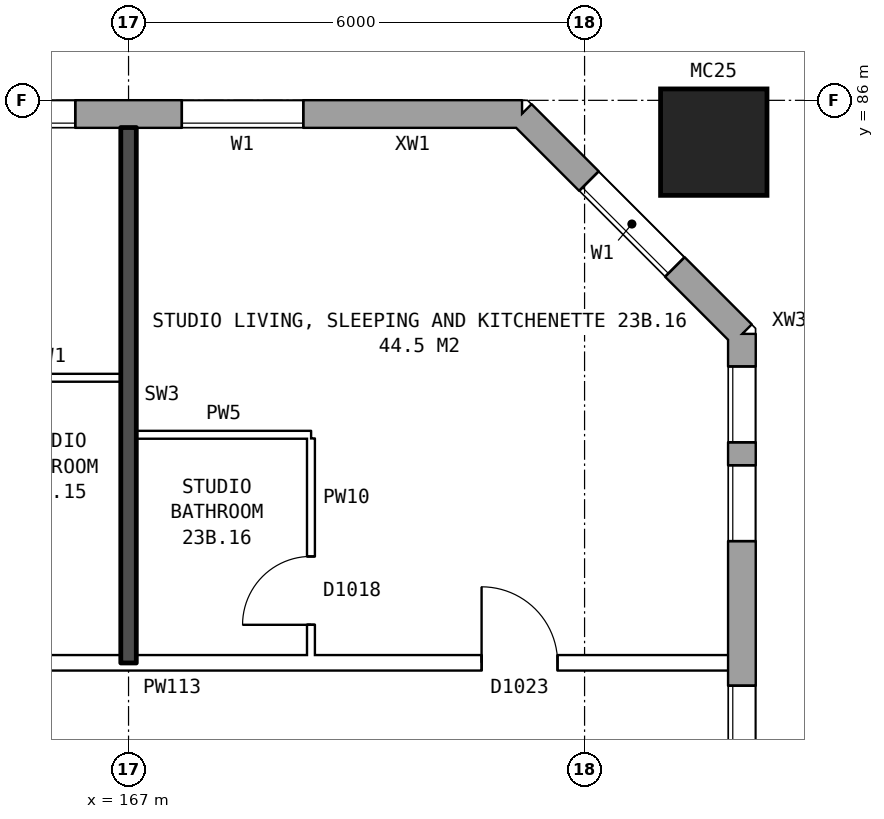
"""IFC4 building model, lengths in metres.
Left out: names, types, materials, properties, quantities, classifications, styles, units other than length and angle.
Written with IfcOpenShell. Run it as: python <this file> out.ifc"""

import sys

from ifc_helpers import new_model, si_unit, direction, frame, frame_2d, origin, origin_2d, place, context, subcontext, project, spatial, rectangle, hollow_rectangle, extrude, element, fill, save


model = new_model("IFC4")
c1 = context("Model", 3, precision=1e-05, world=origin(), true_north=direction((0.0, 1.0)))
c2 = subcontext(c1, "Body", "Model", "MODEL_VIEW")
j1 = project(units=[si_unit("LENGTHUNIT", "METRE"), si_unit("PLANEANGLEUNIT", "RADIAN")], contexts=[c1])
p1 = place(None, origin())
s1 = spatial("IfcSite", under=j1, at=p1, CompositionType="ELEMENT")
p2 = place(p1, origin())
s2 = spatial("IfcBuilding", under=s1, at=p2, CompositionType="ELEMENT")
p3 = place(p2, frame((0.0, 0.0, 84.0)))
s3 = spatial("IfcBuildingStorey", under=s2, at=p3, CompositionType="ELEMENT", Elevation=84.0)
p4 = place(p3, frame((174.7, 85.45, 0.0), z_axis=(0.0, 0.0, 1.0), x_axis=(1.0, 0.0, 0.0)))
e1 = element("IfcColumn", 1, at=p4, inside=s3, PredefinedType="COLUMN", context=c2, shape_type="SweptSolid", body=[
    extrude(hollow_rectangle(XDim=1.4, YDim=1.4, WallThickness=0.075, at=origin_2d()), origin(), (0.0, 0.0, 1.0), 3.1),
])
p5 = place(p3, frame((175.07, 57.075, 0.0), z_axis=(0.0, 0.0, 1.0), x_axis=(0.0, 1.0, 0.0)))
e2 = element("IfcWall", 2, at=p5, inside=s3, PredefinedType="STANDARD", context=c2, shape_type="SweptSolid", body=[
    extrude(rectangle(XDim=25.851, YDim=0.36, at=frame_2d((12.925, 0.0))), origin(), (0.0, 0.0, 1.0), 2.85),
])
p6 = place(p5, frame((0.3, 0.0, 0.8)))
e3 = element("IfcOpeningElement", 3, at=p6, cuts=e2, PredefinedType="OPENING", context=c2, shape_type="SweptSolid", body=[
    extrude(rectangle(XDim=1.0, YDim=1.8, at=frame_2d((0.5, 0.9))), frame((0.0, 0.19, 0.0), z_axis=(0.0, -1.0, 0.0), x_axis=(1.0, 0.0, 0.0)), (0.0, 0.0, 1.0), 0.38),
])
p7 = place(p5, frame((4.625, 0.0, 0.8)))
e4 = element("IfcOpeningElement", 4, at=p7, cuts=e2, PredefinedType="OPENING", context=c2, shape_type="SweptSolid", body=[
    extrude(rectangle(XDim=1.6, YDim=1.8, at=frame_2d((0.8, 0.9))), frame((0.0, 0.19, 0.0), z_axis=(0.0, -1.0, 0.0), x_axis=(1.0, 0.0, 0.0)), (0.0, 0.0, 1.0), 0.38),
])
p8 = place(p5, frame((7.625, 0.0, 0.8)))
e5 = element("IfcOpeningElement", 5, at=p8, cuts=e2, PredefinedType="OPENING", context=c2, shape_type="SweptSolid", body=[
    extrude(rectangle(XDim=1.6, YDim=1.8, at=frame_2d((0.8, 0.9))), frame((0.0, 0.19, 0.0), z_axis=(0.0, -1.0, 0.0), x_axis=(1.0, 0.0, 0.0)), (0.0, 0.0, 1.0), 0.38),
])
p9 = place(p5, frame((10.625, 0.0, 0.8)))
e6 = element("IfcOpeningElement", 6, at=p9, cuts=e2, PredefinedType="OPENING", context=c2, shape_type="SweptSolid", body=[
    extrude(rectangle(XDim=1.6, YDim=1.8, at=frame_2d((0.8, 0.9))), frame((0.0, 0.19, 0.0), z_axis=(0.0, -1.0, 0.0), x_axis=(1.0, 0.0, 0.0)), (0.0, 0.0, 1.0), 0.38),
])
p10 = place(p5, frame((13.625, 0.0, 0.8)))
e7 = element("IfcOpeningElement", 7, at=p10, cuts=e2, PredefinedType="OPENING", context=c2, shape_type="SweptSolid", body=[
    extrude(rectangle(XDim=1.6, YDim=1.8, at=frame_2d((0.8, 0.9))), frame((0.0, 0.19, 0.0), z_axis=(0.0, -1.0, 0.0), x_axis=(1.0, 0.0, 0.0)), (0.0, 0.0, 1.0), 0.38),
])
p11 = place(p5, frame((16.625, 0.0, 0.8)))
e8 = element("IfcOpeningElement", 8, at=p11, cuts=e2, PredefinedType="OPENING", context=c2, shape_type="SweptSolid", body=[
    extrude(rectangle(XDim=1.6, YDim=1.8, at=frame_2d((0.8, 0.9))), frame((0.0, 0.19, 0.0), z_axis=(0.0, -1.0, 0.0), x_axis=(1.0, 0.0, 0.0)), (0.0, 0.0, 1.0), 0.38),
])
p12 = place(p5, frame((19.625, 0.0, 0.8)))
e9 = element("IfcOpeningElement", 9, at=p12, cuts=e2, PredefinedType="OPENING", context=c2, shape_type="SweptSolid", body=[
    extrude(rectangle(XDim=1.6, YDim=1.8, at=frame_2d((0.8, 0.9))), frame((0.0, 0.19, 0.0), z_axis=(0.0, -1.0, 0.0), x_axis=(1.0, 0.0, 0.0)), (0.0, 0.0, 1.0), 0.38),
])
p13 = place(p5, frame((23.125, 0.0, 0.8)))
e10 = element("IfcOpeningElement", 10, at=p13, cuts=e2, PredefinedType="OPENING", context=c2, shape_type="SweptSolid", body=[
    extrude(rectangle(XDim=1.0, YDim=0.9, at=frame_2d((0.5, 0.45))), frame((0.0, 0.19, 0.0), z_axis=(0.0, -1.0, 0.0), x_axis=(1.0, 0.0, 0.0)), (0.0, 0.0, 1.0), 0.38),
])
p14 = place(p5, frame((1.6, 0.0, 0.8)))
e11 = element("IfcOpeningElement", 11, at=p14, cuts=e2, PredefinedType="OPENING", context=c2, shape_type="SweptSolid", body=[
    extrude(rectangle(XDim=1.0, YDim=0.9, at=frame_2d((0.5, 0.45))), frame((0.0, 0.19, 0.0), z_axis=(0.0, -1.0, 0.0), x_axis=(1.0, 0.0, 0.0)), (0.0, 0.0, 1.0), 0.38),
])
p15 = place(p5, frame((24.425, 0.0, 0.8)))
e12 = element("IfcOpeningElement", 12, at=p15, cuts=e2, PredefinedType="OPENING", context=c2, shape_type="SweptSolid", body=[
    extrude(rectangle(XDim=1.0, YDim=1.8, at=frame_2d((0.5, 0.9))), frame((0.0, 0.19, 0.0), z_axis=(0.0, -1.0, 0.0), x_axis=(1.0, 0.0, 0.0)), (0.0, 0.0, 1.0), 0.38),
])
p16 = place(p3, frame((175.07, 82.925, 0.0), z_axis=(0.0, 0.0, 1.0), x_axis=(-0.707106781187, 0.707106781187, 0.0)))
e13 = element("IfcWall", 13, at=p16, inside=s3, PredefinedType="STANDARD", context=c2, shape_type="SweptSolid", body=[
    extrude(rectangle(XDim=4.094, YDim=0.36, at=frame_2d((2.047, 0.0))), origin(), (0.0, 0.0, 1.0), 2.85),
])
p17 = place(p16, frame((1.247, 0.0, 0.8)))
e14 = element("IfcOpeningElement", 14, at=p17, cuts=e13, PredefinedType="OPENING", context=c2, shape_type="SweptSolid", body=[
    extrude(rectangle(XDim=1.6, YDim=1.8, at=frame_2d((0.8, 0.9))), frame((0.0, 0.19, 0.0), z_axis=(0.0, -1.0, 0.0), x_axis=(1.0, 0.0, 0.0)), (0.0, 0.0, 1.0), 0.38),
])
p18 = place(p3, frame((172.175, 85.82, 0.0), z_axis=(0.0, 0.0, 1.0), x_axis=(-1.0, 0.0, 0.0)))
e15 = element("IfcWall", 15, at=p18, inside=s3, PredefinedType="STANDARD", context=c2, shape_type="SweptSolid", body=[
    extrude(rectangle(XDim=38.101, YDim=0.36, at=frame_2d((19.05, 0.0))), origin(), (0.0, 0.0, 1.0), 2.85),
])
p19 = place(p18, frame((2.875, 0.0, 0.8)))
e16 = element("IfcOpeningElement", 16, at=p19, cuts=e15, PredefinedType="OPENING", context=c2, shape_type="SweptSolid", body=[
    extrude(rectangle(XDim=1.6, YDim=1.8, at=frame_2d((0.8, 0.9))), frame((0.0, 0.19, 0.0), z_axis=(0.0, -1.0, 0.0), x_axis=(1.0, 0.0, 0.0)), (0.0, 0.0, 1.0), 0.38),
])
p20 = place(p18, frame((5.875, 0.0, 0.8)))
e17 = element("IfcOpeningElement", 17, at=p20, cuts=e15, PredefinedType="OPENING", context=c2, shape_type="SweptSolid", body=[
    extrude(rectangle(XDim=1.6, YDim=1.8, at=frame_2d((0.8, 0.9))), frame((0.0, 0.19, 0.0), z_axis=(0.0, -1.0, 0.0), x_axis=(1.0, 0.0, 0.0)), (0.0, 0.0, 1.0), 0.38),
])
p21 = place(p18, frame((8.875, 0.0, 0.8)))
e18 = element("IfcOpeningElement", 18, at=p21, cuts=e15, PredefinedType="OPENING", context=c2, shape_type="SweptSolid", body=[
    extrude(rectangle(XDim=1.6, YDim=1.8, at=frame_2d((0.8, 0.9))), frame((0.0, 0.19, 0.0), z_axis=(0.0, -1.0, 0.0), x_axis=(1.0, 0.0, 0.0)), (0.0, 0.0, 1.0), 0.38),
])
p22 = place(p18, frame((11.875, 0.0, 0.8)))
e19 = element("IfcOpeningElement", 19, at=p22, cuts=e15, PredefinedType="OPENING", context=c2, shape_type="SweptSolid", body=[
    extrude(rectangle(XDim=1.6, YDim=1.8, at=frame_2d((0.8, 0.9))), frame((0.0, 0.19, 0.0), z_axis=(0.0, -1.0, 0.0), x_axis=(1.0, 0.0, 0.0)), (0.0, 0.0, 1.0), 0.38),
])
p23 = place(p18, frame((13.775, 0.0, 1.6)))
e20 = element("IfcOpeningElement", 20, at=p23, cuts=e15, PredefinedType="OPENING", context=c2, shape_type="SweptSolid", body=[
    extrude(rectangle(XDim=0.6, YDim=0.9, at=frame_2d((0.3, 0.45))), frame((0.0, 0.19, 0.0), z_axis=(0.0, -1.0, 0.0), x_axis=(1.0, 0.0, 0.0)), (0.0, 0.0, 1.0), 0.38),
])
p24 = place(p18, frame((17.875, 0.0, 0.8)))
e21 = element("IfcOpeningElement", 21, at=p24, cuts=e15, PredefinedType="OPENING", context=c2, shape_type="SweptSolid", body=[
    extrude(rectangle(XDim=1.6, YDim=1.8, at=frame_2d((0.8, 0.9))), frame((0.0, 0.19, 0.0), z_axis=(0.0, -1.0, 0.0), x_axis=(1.0, 0.0, 0.0)), (0.0, 0.0, 1.0), 0.38),
])
p25 = place(p18, frame((20.325, 0.0, 0.65)))
e22 = element("IfcOpeningElement", 22, at=p25, cuts=e15, PredefinedType="OPENING", context=c2, shape_type="SweptSolid", body=[
    extrude(rectangle(XDim=1.4, YDim=1.8, at=frame_2d((0.7, 0.9))), frame((0.0, 0.19, 0.0), z_axis=(0.0, -1.0, 0.0), x_axis=(1.0, 0.0, 0.0)), (0.0, 0.0, 1.0), 0.38),
])
p26 = place(p18, frame((23.625, 0.0, 1.7)))
e23 = element("IfcOpeningElement", 23, at=p26, cuts=e15, PredefinedType="OPENING", context=c2, shape_type="SweptSolid", body=[
    extrude(rectangle(XDim=0.6, YDim=0.9, at=frame_2d((0.3, 0.45))), frame((0.0, 0.19, 0.0), z_axis=(0.0, -1.0, 0.0), x_axis=(1.0, 0.0, 0.0)), (0.0, 0.0, 1.0), 0.38),
])
p27 = place(p18, frame((26.875, 0.0, 0.8)))
e24 = element("IfcOpeningElement", 24, at=p27, cuts=e15, PredefinedType="OPENING", context=c2, shape_type="SweptSolid", body=[
    extrude(rectangle(XDim=1.6, YDim=1.8, at=frame_2d((0.8, 0.9))), frame((0.0, 0.19, 0.0), z_axis=(0.0, -1.0, 0.0), x_axis=(1.0, 0.0, 0.0)), (0.0, 0.0, 1.0), 0.38),
])
p28 = place(p18, frame((29.875, 0.0, 0.8)))
e25 = element("IfcOpeningElement", 25, at=p28, cuts=e15, PredefinedType="OPENING", context=c2, shape_type="SweptSolid", body=[
    extrude(rectangle(XDim=1.6, YDim=1.8, at=frame_2d((0.8, 0.9))), frame((0.0, 0.19, 0.0), z_axis=(0.0, -1.0, 0.0), x_axis=(1.0, 0.0, 0.0)), (0.0, 0.0, 1.0), 0.38),
])
p29 = place(p18, frame((32.875, 0.0, 0.8)))
e26 = element("IfcOpeningElement", 26, at=p29, cuts=e15, PredefinedType="OPENING", context=c2, shape_type="SweptSolid", body=[
    extrude(rectangle(XDim=1.6, YDim=1.8, at=frame_2d((0.8, 0.9))), frame((0.0, 0.19, 0.0), z_axis=(0.0, -1.0, 0.0), x_axis=(1.0, 0.0, 0.0)), (0.0, 0.0, 1.0), 0.38),
])
p30 = place(p18, frame((35.875, 0.0, 0.8)))
e27 = element("IfcOpeningElement", 27, at=p30, cuts=e15, PredefinedType="OPENING", context=c2, shape_type="SweptSolid", body=[
    extrude(rectangle(XDim=1.6, YDim=1.8, at=frame_2d((0.8, 0.9))), frame((0.0, 0.19, 0.0), z_axis=(0.0, -1.0, 0.0), x_axis=(1.0, 0.0, 0.0)), (0.0, 0.0, 1.0), 0.38),
])
p31 = place(p18, frame((15.925, 0.0, 0.8)))
e28 = element("IfcOpeningElement", 28, at=p31, cuts=e15, PredefinedType="OPENING", context=c2, shape_type="SweptSolid", body=[
    extrude(rectangle(XDim=1.0, YDim=1.2, at=frame_2d((0.5, 0.6))), frame((0.0, 0.19, 0.0), z_axis=(0.0, -1.0, 0.0), x_axis=(1.0, 0.0, 0.0)), (0.0, 0.0, 1.0), 0.38),
])
p32 = place(p18, frame((22.025, 0.0, 0.65)))
e29 = element("IfcOpeningElement", 29, at=p32, cuts=e15, PredefinedType="OPENING", context=c2, shape_type="SweptSolid", body=[
    extrude(rectangle(XDim=0.6, YDim=0.9, at=frame_2d((0.3, 0.45))), frame((0.0, 0.19, 0.0), z_axis=(0.0, -1.0, 0.0), x_axis=(1.0, 0.0, 0.0)), (0.0, 0.0, 1.0), 0.38),
])
p33 = place(p18, frame((24.525, 0.0, 0.8)))
e30 = element("IfcOpeningElement", 30, at=p33, cuts=e15, PredefinedType="OPENING", context=c2, shape_type="SweptSolid", body=[
    extrude(rectangle(XDim=1.4, YDim=1.8, at=frame_2d((0.7, 0.9))), frame((0.0, 0.19, 0.0), z_axis=(0.0, -1.0, 0.0), x_axis=(1.0, 0.0, 0.0)), (0.0, 0.0, 1.0), 0.38),
])
p34 = place(p3, frame((155.1, 78.6, 0.0), z_axis=(0.0, 0.0, 1.0), x_axis=(1.0, 0.0, 0.0)))
e31 = element("IfcWall", 31, at=p34, inside=s3, PredefinedType="PARTITIONING", context=c2, shape_type="SweptSolid", body=[
    extrude(rectangle(XDim=19.79, YDim=0.2, at=frame_2d((9.895, 0.0))), origin(), (0.0, 0.0, 1.0), 2.85),
])
p35 = place(p34, frame((3.6, 0.0, 0.0)))
e32 = element("IfcOpeningElement", 32, at=p35, cuts=e31, PredefinedType="OPENING", context=c2, shape_type="SweptSolid", body=[
    extrude(rectangle(XDim=1.0, YDim=2.1, at=frame_2d((0.5, 1.05))), frame((0.0, 0.11, 0.0), z_axis=(0.0, -1.0, 0.0), x_axis=(1.0, 0.0, 0.0)), (0.0, 0.0, 1.0), 0.22),
])
p36 = place(p34, frame((7.4, 0.0, 0.0)))
e33 = element("IfcOpeningElement", 33, at=p36, cuts=e31, PredefinedType="OPENING", context=c2, shape_type="SweptSolid", body=[
    extrude(rectangle(XDim=1.0, YDim=2.1, at=frame_2d((0.5, 1.05))), frame((0.0, 0.11, 0.0), z_axis=(0.0, -1.0, 0.0), x_axis=(1.0, 0.0, 0.0)), (0.0, 0.0, 1.0), 0.22),
])
p37 = place(p34, frame((16.545, 0.0, 0.0)))
e34 = element("IfcOpeningElement", 34, at=p37, cuts=e31, PredefinedType="OPENING", context=c2, shape_type="SweptSolid", body=[
    extrude(rectangle(XDim=1.0, YDim=2.1, at=frame_2d((0.5, 1.05))), frame((0.0, 0.11, 0.0), z_axis=(0.0, -1.0, 0.0), x_axis=(1.0, 0.0, 0.0)), (0.0, 0.0, 1.0), 0.22),
])
p38 = place(p3, frame((167.1, 81.6, 0.0), z_axis=(0.0, 0.0, 1.0), x_axis=(1.0, 0.0, 0.0)))
e35 = element("IfcWall", 35, at=p38, inside=s3, PredefinedType="PARTITIONING", context=c2, shape_type="SweptSolid", body=[
    extrude(rectangle(XDim=2.3, YDim=0.1, at=frame_2d((1.15, 0.0))), origin(), (0.0, 0.0, 1.0), 2.85),
])
p39 = place(p3, frame((165.0, 82.35, 0.0), z_axis=(0.0, 0.0, 1.0), x_axis=(1.0, 0.0, 0.0)))
e36 = element("IfcWall", 36, at=p39, inside=s3, PredefinedType="PARTITIONING", context=c2, shape_type="SweptSolid", body=[
    extrude(rectangle(XDim=1.9, YDim=0.1, at=frame_2d((0.95, 0.0))), origin(), (0.0, 0.0, 1.0), 2.85),
])
p40 = place(p3, frame((167.0, 78.6, 0.0), z_axis=(0.0, 0.0, 1.0), x_axis=(0.0, 1.0, 0.0)))
e37 = element("IfcWall", 37, at=p40, inside=s3, PredefinedType="SOLIDWALL", context=c2, shape_type="SweptSolid", body=[
    extrude(rectangle(XDim=7.04, YDim=0.2, at=frame_2d((3.52, 0.0))), origin(), (0.0, 0.0, 1.0), 2.85),
])
p41 = place(p3, frame((169.4, 78.7, 0.0), z_axis=(0.0, 0.0, 1.0), x_axis=(0.0, 1.0, 0.0)))
e38 = element("IfcWall", 38, at=p41, inside=s3, PredefinedType="PARTITIONING", context=c2, shape_type="SweptSolid", body=[
    extrude(rectangle(XDim=2.85, YDim=0.1, at=frame_2d((1.425, 0.0))), origin(), (0.0, 0.0, 1.0), 2.85),
])
p42 = place(p41, frame((0.4, 0.0, 0.0)))
e39 = element("IfcOpeningElement", 39, at=p42, cuts=e38, PredefinedType="OPENING", context=c2, shape_type="SweptSolid", body=[
    extrude(rectangle(XDim=0.9, YDim=2.1, at=frame_2d((0.45, 1.05))), frame((0.0, 0.06, 0.0), z_axis=(0.0, -1.0, 0.0), x_axis=(1.0, 0.0, 0.0)), (0.0, 0.0, 1.0), 0.12),
])
p43 = place(p12, origin())
e40 = element("IfcWindow", 40, at=p43, inside=s3, PartitioningType="SINGLE_PANEL", PredefinedType="WINDOW", context=c2, shape_type="SweptSolid", body=[
    extrude(rectangle(XDim=1.6, YDim=1.8, at=frame_2d((0.8, 0.9))), frame((0.0, 0.15, 0.0), z_axis=(0.0, -1.0, 0.0), x_axis=(1.0, 0.0, 0.0)), (0.0, 0.0, 1.0), 0.06),
])
fill(e9, e40)
p44 = place(p13, origin())
e41 = element("IfcWindow", 41, at=p44, inside=s3, PartitioningType="SINGLE_PANEL", PredefinedType="WINDOW", context=c2, shape_type="SweptSolid", body=[
    extrude(rectangle(XDim=1.0, YDim=0.9, at=frame_2d((0.5, 0.45))), frame((0.0, 0.15, 0.0), z_axis=(0.0, -1.0, 0.0), x_axis=(1.0, 0.0, 0.0)), (0.0, 0.0, 1.0), 0.06),
])
fill(e10, e41)
p45 = place(p17, origin())
e42 = element("IfcWindow", 42, at=p45, inside=s3, PartitioningType="SINGLE_PANEL", PredefinedType="WINDOW", context=c2, shape_type="SweptSolid", body=[
    extrude(rectangle(XDim=1.6, YDim=1.8, at=frame_2d((0.8, 0.9))), frame((0.0, 0.15, 0.0), z_axis=(0.0, -1.0, 0.0), x_axis=(1.0, 0.0, 0.0)), (0.0, 0.0, 1.0), 0.06),
])
fill(e14, e42)
p46 = place(p19, origin())
e43 = element("IfcWindow", 43, at=p46, inside=s3, PartitioningType="SINGLE_PANEL", PredefinedType="WINDOW", context=c2, shape_type="SweptSolid", body=[
    extrude(rectangle(XDim=1.6, YDim=1.8, at=frame_2d((0.8, 0.9))), frame((0.0, 0.15, 0.0), z_axis=(0.0, -1.0, 0.0), x_axis=(1.0, 0.0, 0.0)), (0.0, 0.0, 1.0), 0.06),
])
fill(e16, e43)
p47 = place(p20, origin())
e44 = element("IfcWindow", 44, at=p47, inside=s3, PartitioningType="SINGLE_PANEL", PredefinedType="WINDOW", context=c2, shape_type="SweptSolid", body=[
    extrude(rectangle(XDim=1.6, YDim=1.8, at=frame_2d((0.8, 0.9))), frame((0.0, 0.15, 0.0), z_axis=(0.0, -1.0, 0.0), x_axis=(1.0, 0.0, 0.0)), (0.0, 0.0, 1.0), 0.06),
])
fill(e17, e44)
p48 = place(p37, origin())
e45 = element("IfcDoor", 45, at=p48, inside=s3, OperationType="SINGLE_SWING_LEFT", PredefinedType="DOOR", context=c2, shape_type="SweptSolid", body=[
    extrude(rectangle(XDim=1.0, YDim=2.1, at=frame_2d((0.5, 1.05))), frame((0.0, 0.025, 0.0), z_axis=(0.0, -1.0, 0.0), x_axis=(1.0, 0.0, 0.0)), (0.0, 0.0, 1.0), 0.05),
])
fill(e34, e45)
p49 = place(p42, origin())
e46 = element("IfcDoor", 46, at=p49, inside=s3, OperationType="SINGLE_SWING_LEFT", PredefinedType="DOOR", context=c2, shape_type="SweptSolid", body=[
    extrude(rectangle(XDim=0.9, YDim=2.1, at=frame_2d((0.45, 1.05))), frame((0.0, 0.025, 0.0), z_axis=(0.0, -1.0, 0.0), x_axis=(1.0, 0.0, 0.0)), (0.0, 0.0, 1.0), 0.05),
])
fill(e39, e46)
p50 = place(p15, origin())
e47 = element("IfcWindow", 47, at=p50, inside=s3, PartitioningType="SINGLE_PANEL", PredefinedType="WINDOW", context=c2, shape_type="SweptSolid", body=[
    extrude(rectangle(XDim=1.0, YDim=1.8, at=frame_2d((0.5, 0.9))), frame((0.0, 0.15, 0.0), z_axis=(0.0, -1.0, 0.0), x_axis=(1.0, 0.0, 0.0)), (0.0, 0.0, 1.0), 0.06),
])
fill(e12, e47)
save(model, sys.argv[1])
